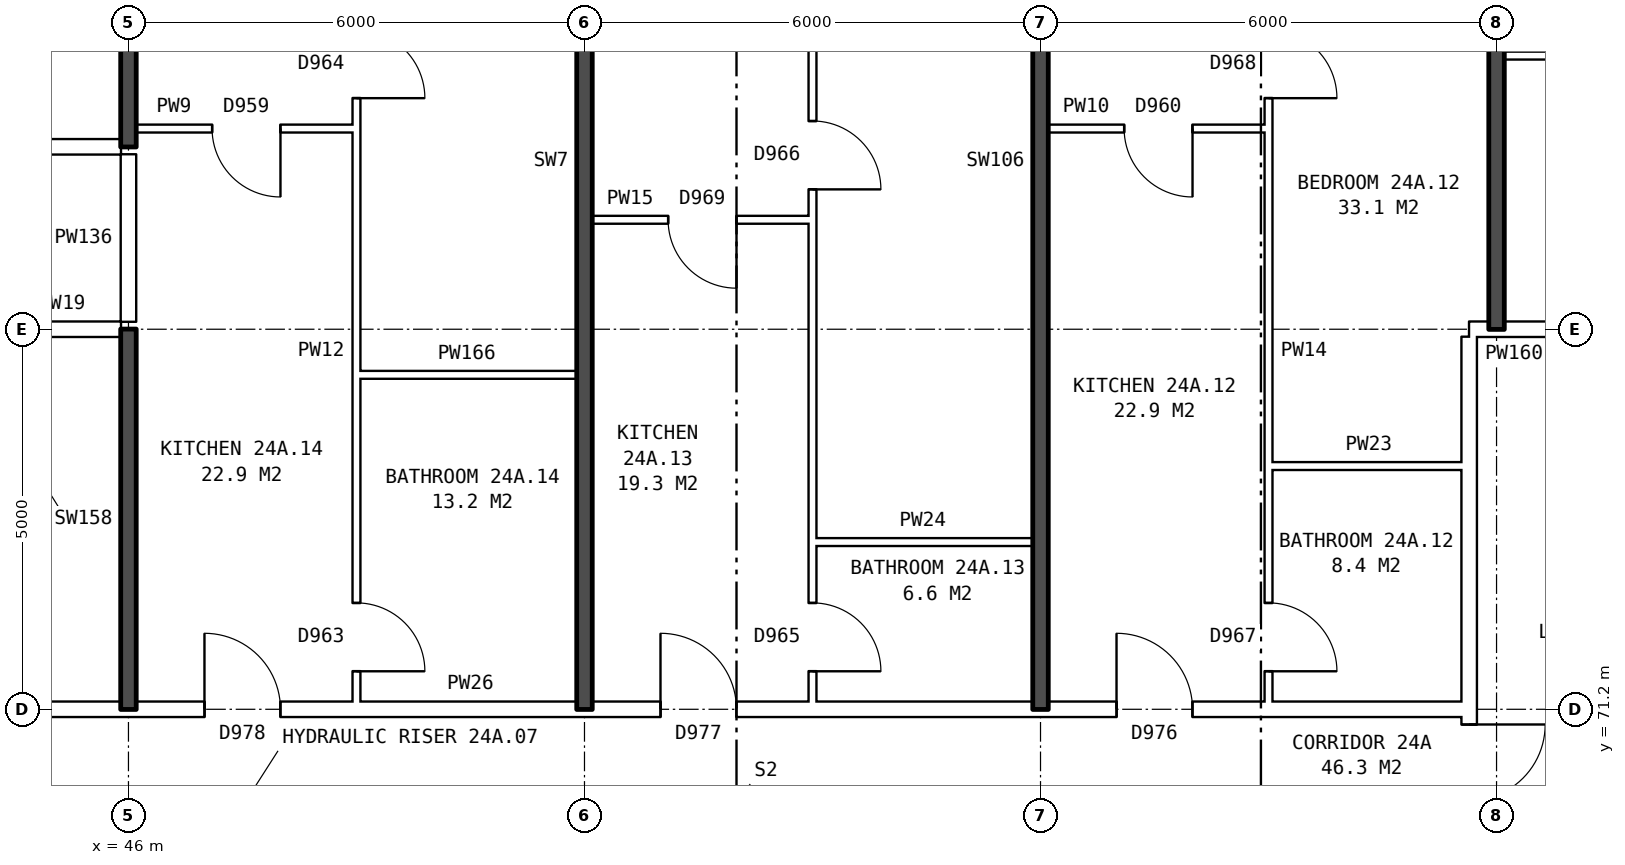
"""IFC4 building model, lengths in metres.
Left out: names, types, materials, properties, quantities, classifications, styles, units other than length and angle.
Written with IfcOpenShell. Run it as: python <this file> out.ifc"""

import sys

from ifc_helpers import new_model, si_unit, direction, frame, frame_2d, origin, place, context, subcontext, project, spatial, rectangle, extrude, element, fill, save


model = new_model("IFC4")
c1 = context("Model", 3, precision=1e-05, world=origin(), true_north=direction((0.0, 1.0)))
c2 = subcontext(c1, "Body", "Model", "MODEL_VIEW")
j1 = project(units=[si_unit("LENGTHUNIT", "METRE"), si_unit("PLANEANGLEUNIT", "RADIAN")], contexts=[c1])
p1 = place(None, origin())
s1 = spatial("IfcSite", under=j1, at=p1, CompositionType="ELEMENT")
p2 = place(p1, origin())
s2 = spatial("IfcBuilding", under=s1, at=p2, CompositionType="ELEMENT")
p3 = place(p2, frame((0.0, 0.0, 87.1)))
s3 = spatial("IfcBuildingStorey", under=s2, at=p3, CompositionType="ELEMENT", Elevation=87.1)
p4 = place(p3, frame((63.64, 63.9, 0.0), z_axis=(0.0, 0.0, 1.0), x_axis=(0.0, 1.0, 0.0)))
e1 = element("IfcWall", 1, at=p4, inside=s3, PredefinedType="PARTITIONING", context=c2, shape_type="SweptSolid", body=[
    extrude(rectangle(XDim=12.2, YDim=0.2, at=frame_2d((6.1, 0.0))), origin(), (0.0, 0.0, 1.0), 2.85),
])
p5 = place(p4, frame((5.1, 0.0, 0.0)))
e2 = element("IfcOpeningElement", 2, at=p5, cuts=e1, PredefinedType="OPENING", context=c2, shape_type="SweptSolid", body=[
    extrude(rectangle(XDim=2.0, YDim=2.1, at=frame_2d((1.0, 1.05))), frame((0.0, 0.11, 0.0), z_axis=(0.0, -1.0, 0.0), x_axis=(1.0, 0.0, 0.0)), (0.0, 0.0, 1.0), 0.22),
])
p6 = place(p3, frame((44.36, 71.2, 0.0), z_axis=(0.0, 0.0, 1.0), x_axis=(1.0, 0.0, 0.0)))
e3 = element("IfcWall", 3, at=p6, inside=s3, PredefinedType="PARTITIONING", context=c2, shape_type="SweptSolid", body=[
    extrude(rectangle(XDim=19.28, YDim=0.2, at=frame_2d((9.64, 0.0))), origin(), (0.0, 0.0, 1.0), 2.85),
])
p7 = place(p6, frame((14.64, 0.0, 0.0)))
e4 = element("IfcOpeningElement", 4, at=p7, cuts=e3, PredefinedType="OPENING", context=c2, shape_type="SweptSolid", body=[
    extrude(rectangle(XDim=1.0, YDim=2.1, at=frame_2d((0.5, 1.05))), frame((0.0, 0.11, 0.0), z_axis=(0.0, -1.0, 0.0), x_axis=(1.0, 0.0, 0.0)), (0.0, 0.0, 1.0), 0.22),
])
p8 = place(p6, frame((8.64, 0.0, 0.0)))
e5 = element("IfcOpeningElement", 5, at=p8, cuts=e3, PredefinedType="OPENING", context=c2, shape_type="SweptSolid", body=[
    extrude(rectangle(XDim=1.0, YDim=2.1, at=frame_2d((0.5, 1.05))), frame((0.0, 0.11, 0.0), z_axis=(0.0, -1.0, 0.0), x_axis=(1.0, 0.0, 0.0)), (0.0, 0.0, 1.0), 0.22),
])
p9 = place(p6, frame((2.64, 0.0, 0.0)))
e6 = element("IfcOpeningElement", 6, at=p9, cuts=e3, PredefinedType="OPENING", context=c2, shape_type="SweptSolid", body=[
    extrude(rectangle(XDim=1.0, YDim=2.1, at=frame_2d((0.5, 1.05))), frame((0.0, 0.11, 0.0), z_axis=(0.0, -1.0, 0.0), x_axis=(1.0, 0.0, 0.0)), (0.0, 0.0, 1.0), 0.22),
])
p10 = place(p3, frame((55.0, 73.4, 0.0), z_axis=(0.0, 0.0, 1.0), x_axis=(1.0, 0.0, 0.0)))
e7 = element("IfcWall", 7, at=p10, inside=s3, PredefinedType="PARTITIONING", context=c2, shape_type="SweptSolid", body=[
    extrude(rectangle(XDim=2.9, YDim=0.1, at=frame_2d((1.45, 0.0))), origin(), (0.0, 0.0, 1.0), 2.85),
])
p11 = place(p3, frame((61.0, 74.4, 0.0), z_axis=(0.0, 0.0, 1.0), x_axis=(1.0, 0.0, 0.0)))
e8 = element("IfcWall", 8, at=p11, inside=s3, PredefinedType="PARTITIONING", context=c2, shape_type="SweptSolid", body=[
    extrude(rectangle(XDim=2.64, YDim=0.1, at=frame_2d((1.32, 0.0))), origin(), (0.0, 0.0, 1.0), 2.85),
])
p12 = place(p3, frame((49.0, 75.6, 0.0), z_axis=(0.0, 0.0, 1.0), x_axis=(1.0, 0.0, 0.0)))
e9 = element("IfcWall", 9, at=p12, inside=s3, PredefinedType="PARTITIONING", context=c2, shape_type="SweptSolid", body=[
    extrude(rectangle(XDim=2.9, YDim=0.1, at=frame_2d((1.45, 0.0))), origin(), (0.0, 0.0, 1.0), 2.85),
])
p13 = place(p3, frame((44.36, 76.2, 0.0), z_axis=(0.0, 0.0, 1.0), x_axis=(1.0, 0.0, 0.0)))
e10 = element("IfcWall", 10, at=p13, inside=s3, PredefinedType="PARTITIONING", context=c2, shape_type="SweptSolid", body=[
    extrude(rectangle(XDim=1.54, YDim=0.2, at=frame_2d((0.77, 0.0))), origin(), (0.0, 0.0, 1.0), 2.85),
])
p14 = place(p3, frame((63.64, 76.2, 0.0), z_axis=(0.0, 0.0, 1.0), x_axis=(1.0, 0.0, 0.0)))
e11 = element("IfcWall", 11, at=p14, inside=s3, PredefinedType="PARTITIONING", context=c2, shape_type="SweptSolid", body=[
    extrude(rectangle(XDim=3.0, YDim=0.2, at=frame_2d((1.5, 0.0))), origin(), (0.0, 0.0, 1.0), 2.85),
])
p15 = place(p14, frame((1.18, 0.0, 0.0)))
e12 = element("IfcOpeningElement", 12, at=p15, cuts=e11, PredefinedType="OPENING", context=c2, shape_type="SweptSolid", body=[
    extrude(rectangle(XDim=1.0, YDim=2.1, at=frame_2d((0.5, 1.05))), frame((0.0, 0.11, 0.0), z_axis=(0.0, -1.0, 0.0), x_axis=(1.0, 0.0, 0.0)), (0.0, 0.0, 1.0), 0.22),
])
p16 = place(p3, frame((52.1, 77.64, 0.0), z_axis=(0.0, 0.0, 1.0), x_axis=(1.0, 0.0, 0.0)))
e13 = element("IfcWall", 13, at=p16, inside=s3, PredefinedType="PARTITIONING", context=c2, shape_type="SweptSolid", body=[
    extrude(rectangle(XDim=2.9, YDim=0.1, at=frame_2d((1.45, 0.0))), origin(), (0.0, 0.0, 1.0), 2.85),
])
p17 = place(p16, frame((1.0, 0.0, 0.0)))
e14 = element("IfcOpeningElement", 14, at=p17, cuts=e13, PredefinedType="OPENING", context=c2, shape_type="SweptSolid", body=[
    extrude(rectangle(XDim=0.9, YDim=2.1, at=frame_2d((0.45, 1.05))), frame((0.0, 0.06, 0.0), z_axis=(0.0, -1.0, 0.0), x_axis=(1.0, 0.0, 0.0)), (0.0, 0.0, 1.0), 0.12),
])
p18 = place(p3, frame((23.61, 78.6, 0.0), z_axis=(0.0, 0.0, 1.0), x_axis=(1.0, 0.0, 0.0)))
e15 = element("IfcWall", 15, at=p18, inside=s3, PredefinedType="PARTITIONING", context=c2, shape_type="SweptSolid", body=[
    extrude(rectangle(XDim=22.29, YDim=0.2, at=frame_2d((11.145, 0.0))), origin(), (0.0, 0.0, 1.0), 2.85),
])
p19 = place(p18, frame((18.84, 0.0, 0.0)))
e16 = element("IfcOpeningElement", 16, at=p19, cuts=e15, PredefinedType="OPENING", context=c2, shape_type="SweptSolid", body=[
    extrude(rectangle(XDim=1.0, YDim=2.1, at=frame_2d((0.5, 1.05))), frame((0.0, 0.11, 0.0), z_axis=(0.0, -1.0, 0.0), x_axis=(1.0, 0.0, 0.0)), (0.0, 0.0, 1.0), 0.22),
])
p20 = place(p18, frame((6.89, 0.0, 0.0)))
e17 = element("IfcOpeningElement", 17, at=p20, cuts=e15, PredefinedType="OPENING", context=c2, shape_type="SweptSolid", body=[
    extrude(rectangle(XDim=1.0, YDim=2.1, at=frame_2d((0.5, 1.05))), frame((0.0, 0.11, 0.0), z_axis=(0.0, -1.0, 0.0), x_axis=(1.0, 0.0, 0.0)), (0.0, 0.0, 1.0), 0.22),
])
p21 = place(p3, frame((46.1, 78.84, 0.0), z_axis=(0.0, 0.0, 1.0), x_axis=(1.0, 0.0, 0.0)))
e18 = element("IfcWall", 18, at=p21, inside=s3, PredefinedType="PARTITIONING", context=c2, shape_type="SweptSolid", body=[
    extrude(rectangle(XDim=2.9, YDim=0.1, at=frame_2d((1.45, 0.0))), origin(), (0.0, 0.0, 1.0), 2.85),
])
p22 = place(p21, frame((1.0, 0.0, 0.0)))
e19 = element("IfcOpeningElement", 19, at=p22, cuts=e18, PredefinedType="OPENING", context=c2, shape_type="SweptSolid", body=[
    extrude(rectangle(XDim=0.9, YDim=2.1, at=frame_2d((0.45, 1.05))), frame((0.0, 0.06, 0.0), z_axis=(0.0, -1.0, 0.0), x_axis=(1.0, 0.0, 0.0)), (0.0, 0.0, 1.0), 0.12),
])
p23 = place(p3, frame((58.1, 78.84, 0.0), z_axis=(0.0, 0.0, 1.0), x_axis=(1.0, 0.0, 0.0)))
e20 = element("IfcWall", 20, at=p23, inside=s3, PredefinedType="PARTITIONING", context=c2, shape_type="SweptSolid", body=[
    extrude(rectangle(XDim=2.9, YDim=0.1, at=frame_2d((1.45, 0.0))), origin(), (0.0, 0.0, 1.0), 2.85),
])
p24 = place(p23, frame((1.0, 0.0, 0.0)))
e21 = element("IfcOpeningElement", 21, at=p24, cuts=e20, PredefinedType="OPENING", context=c2, shape_type="SweptSolid", body=[
    extrude(rectangle(XDim=0.9, YDim=2.1, at=frame_2d((0.45, 1.05))), frame((0.0, 0.06, 0.0), z_axis=(0.0, -1.0, 0.0), x_axis=(1.0, 0.0, 0.0)), (0.0, 0.0, 1.0), 0.12),
])
p25 = place(p3, frame((64.1, 79.8, 0.0), z_axis=(0.0, 0.0, 1.0), x_axis=(1.0, 0.0, 0.0)))
e22 = element("IfcWall", 22, at=p25, inside=s3, PredefinedType="PARTITIONING", context=c2, shape_type="SweptSolid", body=[
    extrude(rectangle(XDim=5.8, YDim=0.1, at=frame_2d((2.9, 0.0))), origin(), (0.0, 0.0, 1.0), 2.85),
])
p26 = place(p25, frame((3.6, 0.0, 0.0)))
e23 = element("IfcOpeningElement", 23, at=p26, cuts=e22, PredefinedType="OPENING", context=c2, shape_type="SweptSolid", body=[
    extrude(rectangle(XDim=0.9, YDim=2.1, at=frame_2d((0.45, 1.05))), frame((0.0, 0.06, 0.0), z_axis=(0.0, -1.0, 0.0), x_axis=(1.0, 0.0, 0.0)), (0.0, 0.0, 1.0), 0.12),
])
p27 = place(p25, frame((0.7, 0.0, 0.0)))
e24 = element("IfcOpeningElement", 24, at=p27, cuts=e22, PredefinedType="OPENING", context=c2, shape_type="SweptSolid", body=[
    extrude(rectangle(XDim=0.9, YDim=2.1, at=frame_2d((0.45, 1.05))), frame((0.0, 0.06, 0.0), z_axis=(0.0, -1.0, 0.0), x_axis=(1.0, 0.0, 0.0)), (0.0, 0.0, 1.0), 0.12),
])
p28 = place(p3, frame((46.0, 71.2, 0.0), z_axis=(0.0, 0.0, 1.0), x_axis=(0.0, 1.0, 0.0)))
e25 = element("IfcWall", 25, at=p28, inside=s3, PredefinedType="SOLIDWALL", context=c2, shape_type="SweptSolid", body=[
    extrude(rectangle(XDim=5.0, YDim=0.2, at=frame_2d((2.5, 0.0))), origin(), (0.0, 0.0, 1.0), 2.85),
])
p29 = place(p3, frame((46.0, 76.3, 0.0), z_axis=(0.0, 0.0, 1.0), x_axis=(0.0, 1.0, 0.0)))
e26 = element("IfcWall", 26, at=p29, inside=s3, PredefinedType="PARTITIONING", context=c2, shape_type="SweptSolid", body=[
    extrude(rectangle(XDim=2.2, YDim=0.2, at=frame_2d((1.1, 0.0))), origin(), (0.0, 0.0, 1.0), 2.85),
])
p30 = place(p3, frame((46.0, 78.6, 0.0), z_axis=(0.0, 0.0, 1.0), x_axis=(0.0, 1.0, 0.0)))
e27 = element("IfcWall", 27, at=p30, inside=s3, PredefinedType="SOLIDWALL", context=c2, shape_type="SweptSolid", body=[
    extrude(rectangle(XDim=7.04, YDim=0.2, at=frame_2d((3.52, 0.0))), origin(), (0.0, 0.0, 1.0), 2.85),
])
p31 = place(p3, frame((49.0, 71.3, 0.0), z_axis=(0.0, 0.0, 1.0), x_axis=(0.0, 1.0, 0.0)))
e28 = element("IfcWall", 28, at=p31, inside=s3, PredefinedType="PARTITIONING", context=c2, shape_type="SweptSolid", body=[
    extrude(rectangle(XDim=14.34, YDim=0.1, at=frame_2d((7.17, 0.0))), origin(), (0.0, 0.0, 1.0), 2.85),
])
p32 = place(p31, frame((7.94, 0.0, 0.0)))
e29 = element("IfcOpeningElement", 29, at=p32, cuts=e28, PredefinedType="OPENING", context=c2, shape_type="SweptSolid", body=[
    extrude(rectangle(XDim=0.9, YDim=2.1, at=frame_2d((0.45, 1.05))), frame((0.0, 0.06, 0.0), z_axis=(0.0, -1.0, 0.0), x_axis=(1.0, 0.0, 0.0)), (0.0, 0.0, 1.0), 0.12),
])
p33 = place(p31, frame((0.4, 0.0, 0.0)))
e30 = element("IfcOpeningElement", 30, at=p33, cuts=e28, PredefinedType="OPENING", context=c2, shape_type="SweptSolid", body=[
    extrude(rectangle(XDim=0.9, YDim=2.1, at=frame_2d((0.45, 1.05))), frame((0.0, 0.06, 0.0), z_axis=(0.0, -1.0, 0.0), x_axis=(1.0, 0.0, 0.0)), (0.0, 0.0, 1.0), 0.12),
])
p34 = place(p3, frame((52.0, 71.2, 0.0), z_axis=(0.0, 0.0, 1.0), x_axis=(0.0, 1.0, 0.0)))
e31 = element("IfcWall", 31, at=p34, inside=s3, PredefinedType="SOLIDWALL", context=c2, shape_type="SweptSolid", body=[
    extrude(rectangle(XDim=14.44, YDim=0.2, at=frame_2d((7.22, 0.0))), origin(), (0.0, 0.0, 1.0), 2.85),
])
p35 = place(p3, frame((55.0, 71.3, 0.0), z_axis=(0.0, 0.0, 1.0), x_axis=(0.0, 1.0, 0.0)))
e32 = element("IfcWall", 32, at=p35, inside=s3, PredefinedType="PARTITIONING", context=c2, shape_type="SweptSolid", body=[
    extrude(rectangle(XDim=14.34, YDim=0.1, at=frame_2d((7.17, 0.0))), origin(), (0.0, 0.0, 1.0), 2.85),
])
p36 = place(p35, frame((6.74, 0.0, 0.0)))
e33 = element("IfcOpeningElement", 33, at=p36, cuts=e32, PredefinedType="OPENING", context=c2, shape_type="SweptSolid", body=[
    extrude(rectangle(XDim=0.9, YDim=2.1, at=frame_2d((0.45, 1.05))), frame((0.0, 0.06, 0.0), z_axis=(0.0, -1.0, 0.0), x_axis=(1.0, 0.0, 0.0)), (0.0, 0.0, 1.0), 0.12),
])
p37 = place(p35, frame((0.4, 0.0, 0.0)))
e34 = element("IfcOpeningElement", 34, at=p37, cuts=e32, PredefinedType="OPENING", context=c2, shape_type="SweptSolid", body=[
    extrude(rectangle(XDim=0.9, YDim=2.1, at=frame_2d((0.45, 1.05))), frame((0.0, 0.06, 0.0), z_axis=(0.0, -1.0, 0.0), x_axis=(1.0, 0.0, 0.0)), (0.0, 0.0, 1.0), 0.12),
])
p38 = place(p3, frame((58.0, 71.2, 0.0), z_axis=(0.0, 0.0, 1.0), x_axis=(0.0, 1.0, 0.0)))
e35 = element("IfcWall", 35, at=p38, inside=s3, PredefinedType="SOLIDWALL", context=c2, shape_type="SweptSolid", body=[
    extrude(rectangle(XDim=14.44, YDim=0.2, at=frame_2d((7.22, 0.0))), origin(), (0.0, 0.0, 1.0), 2.85),
])
p39 = place(p3, frame((61.0, 71.3, 0.0), z_axis=(0.0, 0.0, 1.0), x_axis=(0.0, 1.0, 0.0)))
e36 = element("IfcWall", 36, at=p39, inside=s3, PredefinedType="PARTITIONING", context=c2, shape_type="SweptSolid", body=[
    extrude(rectangle(XDim=14.34, YDim=0.1, at=frame_2d((7.17, 0.0))), origin(), (0.0, 0.0, 1.0), 2.85),
])
p40 = place(p39, frame((7.94, 0.0, 0.0)))
e37 = element("IfcOpeningElement", 37, at=p40, cuts=e36, PredefinedType="OPENING", context=c2, shape_type="SweptSolid", body=[
    extrude(rectangle(XDim=0.9, YDim=2.1, at=frame_2d((0.45, 1.05))), frame((0.0, 0.06, 0.0), z_axis=(0.0, -1.0, 0.0), x_axis=(1.0, 0.0, 0.0)), (0.0, 0.0, 1.0), 0.12),
])
p41 = place(p39, frame((0.4, 0.0, 0.0)))
e38 = element("IfcOpeningElement", 38, at=p41, cuts=e36, PredefinedType="OPENING", context=c2, shape_type="SweptSolid", body=[
    extrude(rectangle(XDim=0.9, YDim=2.1, at=frame_2d((0.45, 1.05))), frame((0.0, 0.06, 0.0), z_axis=(0.0, -1.0, 0.0), x_axis=(1.0, 0.0, 0.0)), (0.0, 0.0, 1.0), 0.12),
])
p42 = place(p3, frame((64.0, 76.2, 0.0), z_axis=(0.0, 0.0, 1.0), x_axis=(0.0, 1.0, 0.0)))
e39 = element("IfcWall", 39, at=p42, inside=s3, PredefinedType="SOLIDWALL", context=c2, shape_type="SweptSolid", body=[
    extrude(rectangle(XDim=9.44, YDim=0.2, at=frame_2d((4.72, 0.0))), origin(), (0.0, 0.0, 1.0), 2.85),
])
p43 = place(p5, frame((2.0, 0.0, 0.0), z_axis=(0.0, 0.0, 1.0), x_axis=(-1.0, 0.0, 0.0)))
e40 = element("IfcDoor", 40, at=p43, inside=s3, OperationType="DOUBLE_DOOR_SINGLE_SWING", PredefinedType="DOOR", context=c2, shape_type="SweptSolid", body=[
    extrude(rectangle(XDim=2.0, YDim=2.1, at=frame_2d((1.0, 1.05))), frame((0.0, 0.025, 0.0), z_axis=(0.0, -1.0, 0.0), x_axis=(1.0, 0.0, 0.0)), (0.0, 0.0, 1.0), 0.05),
])
fill(e2, e40)
p44 = place(p40, frame((0.9, 0.0, 0.0), z_axis=(0.0, 0.0, 1.0), x_axis=(-1.0, 0.0, 0.0)))
e41 = element("IfcDoor", 41, at=p44, inside=s3, OperationType="SINGLE_SWING_RIGHT", PredefinedType="DOOR", context=c2, shape_type="SweptSolid", body=[
    extrude(rectangle(XDim=0.9, YDim=2.1, at=frame_2d((0.45, 1.05))), frame((0.0, 0.025, 0.0), z_axis=(0.0, -1.0, 0.0), x_axis=(1.0, 0.0, 0.0)), (0.0, 0.0, 1.0), 0.05),
])
fill(e37, e41)
p45 = place(p7, origin())
e42 = element("IfcDoor", 42, at=p45, inside=s3, OperationType="SINGLE_SWING_LEFT", PredefinedType="DOOR", context=c2, shape_type="SweptSolid", body=[
    extrude(rectangle(XDim=1.0, YDim=2.1, at=frame_2d((0.5, 1.05))), frame((0.0, 0.025, 0.0), z_axis=(0.0, -1.0, 0.0), x_axis=(1.0, 0.0, 0.0)), (0.0, 0.0, 1.0), 0.05),
])
fill(e4, e42)
p46 = place(p24, frame((0.9, 0.0, 0.0), z_axis=(0.0, 0.0, 1.0), x_axis=(-1.0, 0.0, 0.0)))
e43 = element("IfcDoor", 43, at=p46, inside=s3, OperationType="SINGLE_SWING_LEFT", PredefinedType="DOOR", context=c2, shape_type="SweptSolid", body=[
    extrude(rectangle(XDim=0.9, YDim=2.1, at=frame_2d((0.45, 1.05))), frame((0.0, 0.025, 0.0), z_axis=(0.0, -1.0, 0.0), x_axis=(1.0, 0.0, 0.0)), (0.0, 0.0, 1.0), 0.05),
])
fill(e21, e43)
p47 = place(p41, frame((0.9, 0.0, 0.0), z_axis=(0.0, 0.0, 1.0), x_axis=(-1.0, 0.0, 0.0)))
e44 = element("IfcDoor", 44, at=p47, inside=s3, OperationType="SINGLE_SWING_RIGHT", PredefinedType="DOOR", context=c2, shape_type="SweptSolid", body=[
    extrude(rectangle(XDim=0.9, YDim=2.1, at=frame_2d((0.45, 1.05))), frame((0.0, 0.025, 0.0), z_axis=(0.0, -1.0, 0.0), x_axis=(1.0, 0.0, 0.0)), (0.0, 0.0, 1.0), 0.05),
])
fill(e38, e44)
p48 = place(p36, frame((0.9, 0.0, 0.0), z_axis=(0.0, 0.0, 1.0), x_axis=(-1.0, 0.0, 0.0)))
e45 = element("IfcDoor", 45, at=p48, inside=s3, OperationType="SINGLE_SWING_RIGHT", PredefinedType="DOOR", context=c2, shape_type="SweptSolid", body=[
    extrude(rectangle(XDim=0.9, YDim=2.1, at=frame_2d((0.45, 1.05))), frame((0.0, 0.025, 0.0), z_axis=(0.0, -1.0, 0.0), x_axis=(1.0, 0.0, 0.0)), (0.0, 0.0, 1.0), 0.05),
])
fill(e33, e45)
p49 = place(p8, origin())
e46 = element("IfcDoor", 46, at=p49, inside=s3, OperationType="SINGLE_SWING_LEFT", PredefinedType="DOOR", context=c2, shape_type="SweptSolid", body=[
    extrude(rectangle(XDim=1.0, YDim=2.1, at=frame_2d((0.5, 1.05))), frame((0.0, 0.025, 0.0), z_axis=(0.0, -1.0, 0.0), x_axis=(1.0, 0.0, 0.0)), (0.0, 0.0, 1.0), 0.05),
])
fill(e5, e46)
p50 = place(p17, frame((0.9, 0.0, 0.0), z_axis=(0.0, 0.0, 1.0), x_axis=(-1.0, 0.0, 0.0)))
e47 = element("IfcDoor", 47, at=p50, inside=s3, OperationType="SINGLE_SWING_LEFT", PredefinedType="DOOR", context=c2, shape_type="SweptSolid", body=[
    extrude(rectangle(XDim=0.9, YDim=2.1, at=frame_2d((0.45, 1.05))), frame((0.0, 0.025, 0.0), z_axis=(0.0, -1.0, 0.0), x_axis=(1.0, 0.0, 0.0)), (0.0, 0.0, 1.0), 0.05),
])
fill(e14, e47)
p51 = place(p37, frame((0.9, 0.0, 0.0), z_axis=(0.0, 0.0, 1.0), x_axis=(-1.0, 0.0, 0.0)))
e48 = element("IfcDoor", 48, at=p51, inside=s3, OperationType="SINGLE_SWING_RIGHT", PredefinedType="DOOR", context=c2, shape_type="SweptSolid", body=[
    extrude(rectangle(XDim=0.9, YDim=2.1, at=frame_2d((0.45, 1.05))), frame((0.0, 0.025, 0.0), z_axis=(0.0, -1.0, 0.0), x_axis=(1.0, 0.0, 0.0)), (0.0, 0.0, 1.0), 0.05),
])
fill(e34, e48)
p52 = place(p32, frame((0.9, 0.0, 0.0), z_axis=(0.0, 0.0, 1.0), x_axis=(-1.0, 0.0, 0.0)))
e49 = element("IfcDoor", 49, at=p52, inside=s3, OperationType="SINGLE_SWING_RIGHT", PredefinedType="DOOR", context=c2, shape_type="SweptSolid", body=[
    extrude(rectangle(XDim=0.9, YDim=2.1, at=frame_2d((0.45, 1.05))), frame((0.0, 0.025, 0.0), z_axis=(0.0, -1.0, 0.0), x_axis=(1.0, 0.0, 0.0)), (0.0, 0.0, 1.0), 0.05),
])
fill(e29, e49)
p53 = place(p9, origin())
e50 = element("IfcDoor", 50, at=p53, inside=s3, OperationType="SINGLE_SWING_LEFT", PredefinedType="DOOR", context=c2, shape_type="SweptSolid", body=[
    extrude(rectangle(XDim=1.0, YDim=2.1, at=frame_2d((0.5, 1.05))), frame((0.0, 0.025, 0.0), z_axis=(0.0, -1.0, 0.0), x_axis=(1.0, 0.0, 0.0)), (0.0, 0.0, 1.0), 0.05),
])
fill(e6, e50)
p54 = place(p22, frame((0.9, 0.0, 0.0), z_axis=(0.0, 0.0, 1.0), x_axis=(-1.0, 0.0, 0.0)))
e51 = element("IfcDoor", 51, at=p54, inside=s3, OperationType="SINGLE_SWING_LEFT", PredefinedType="DOOR", context=c2, shape_type="SweptSolid", body=[
    extrude(rectangle(XDim=0.9, YDim=2.1, at=frame_2d((0.45, 1.05))), frame((0.0, 0.025, 0.0), z_axis=(0.0, -1.0, 0.0), x_axis=(1.0, 0.0, 0.0)), (0.0, 0.0, 1.0), 0.05),
])
fill(e19, e51)
p55 = place(p33, frame((0.9, 0.0, 0.0), z_axis=(0.0, 0.0, 1.0), x_axis=(-1.0, 0.0, 0.0)))
e52 = element("IfcDoor", 52, at=p55, inside=s3, OperationType="SINGLE_SWING_RIGHT", PredefinedType="DOOR", context=c2, shape_type="SweptSolid", body=[
    extrude(rectangle(XDim=0.9, YDim=2.1, at=frame_2d((0.45, 1.05))), frame((0.0, 0.025, 0.0), z_axis=(0.0, -1.0, 0.0), x_axis=(1.0, 0.0, 0.0)), (0.0, 0.0, 1.0), 0.05),
])
fill(e30, e52)
save(model, sys.argv[1])
